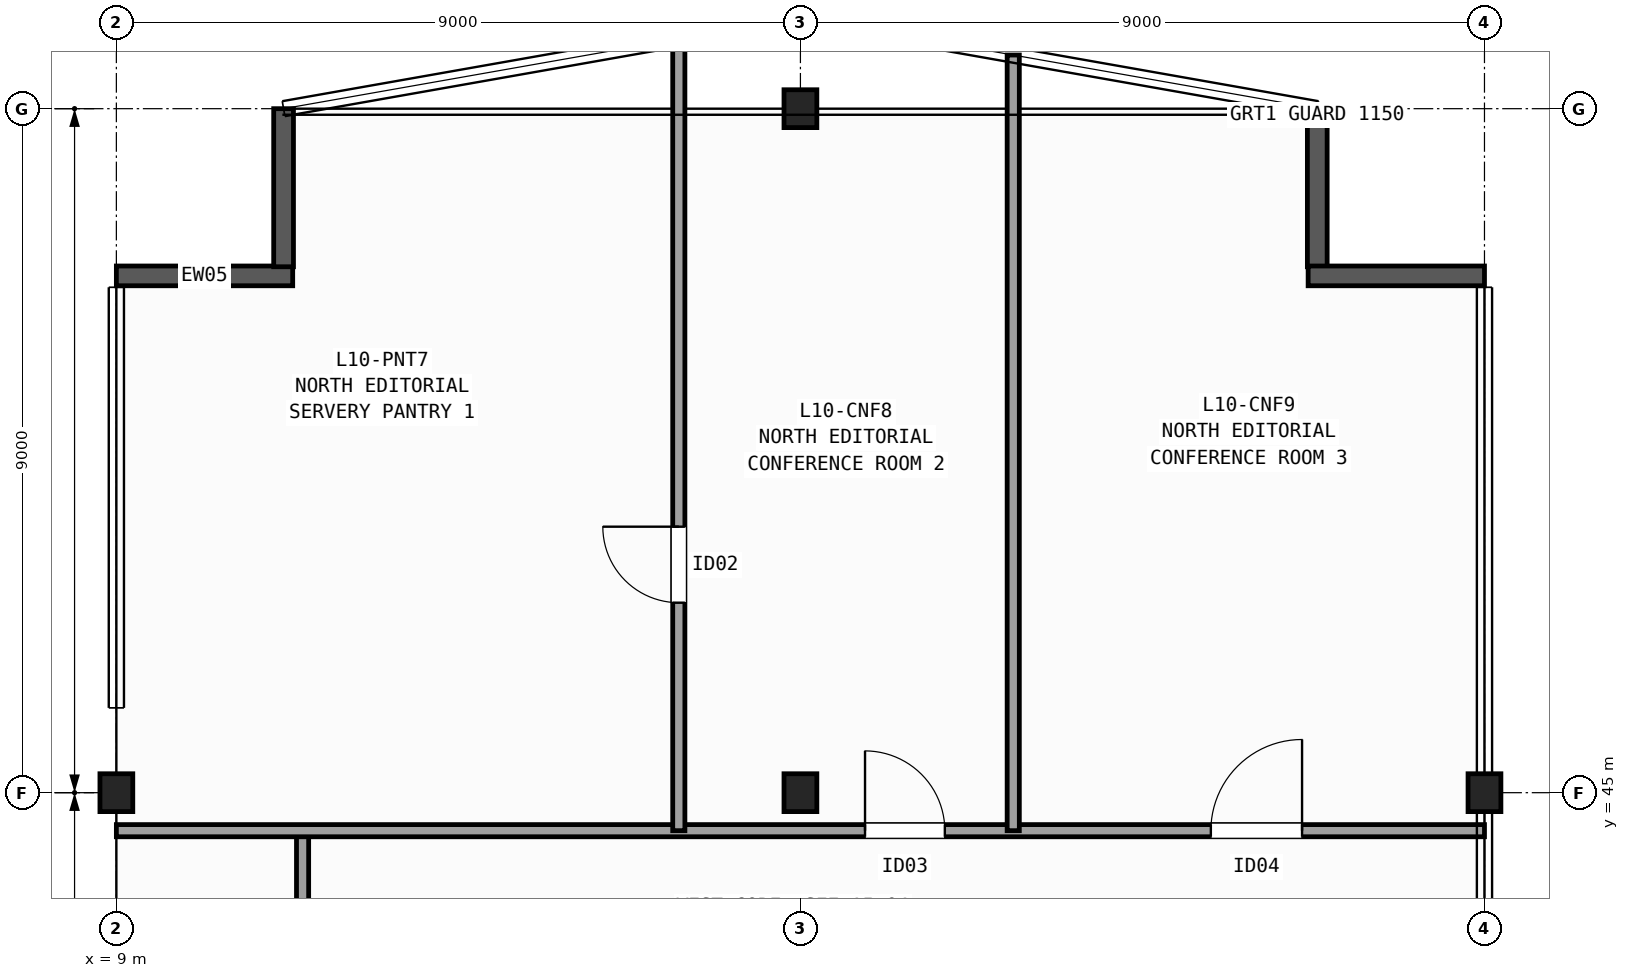
"""IFC4 building model, lengths in metres.
Left out: names, types, materials, properties, quantities, classifications, styles, units other than length and angle.
Written with IfcOpenShell. Run it as: python <this file> out.ifc"""

import sys

from ifc_helpers import new_model, si_unit, direction, frame, frame_2d, origin, origin_2d, place, context, subcontext, project, spatial, rectangle, i_section, extrude, element, fill, save


model = new_model("IFC4")
c1 = context("Model", 3, precision=1e-05, world=origin(), true_north=direction((0.0, 1.0)))
c2 = subcontext(c1, "Body", "Model", "MODEL_VIEW")
j1 = project(units=[si_unit("LENGTHUNIT", "METRE"), si_unit("PLANEANGLEUNIT", "RADIAN")], contexts=[c1])
p1 = place(None, origin())
s1 = spatial("IfcSite", under=j1, at=p1, CompositionType="ELEMENT")
p2 = place(p1, origin())
s2 = spatial("IfcBuilding", under=s1, at=p2, CompositionType="ELEMENT")
p3 = place(p2, frame((0.0, 0.0, 47.1)))
s3 = spatial("IfcBuildingStorey", under=s2, at=p3, CompositionType="ELEMENT", Elevation=47.1)
for number, where, z_axis, x_axis in (
    (1, (9.0, 45.0, 0.0), (0.0, 0.0, 1.0), (1.0, 0.0, 0.0)),
    (2, (18.0, 45.0, 0.0), (0.0, 0.0, 1.0), (1.0, 0.0, 0.0)),
    (3, (18.0, 54.0, 0.0), (0.0, 0.0, 1.0), (1.0, 0.0, 0.0)),
    (4, (27.0, 45.0, 0.0), (0.0, 0.0, 1.0), (1.0, 0.0, 0.0)),
):
    element("IfcColumn", number, at=place(p3, frame(where, z_axis=z_axis, x_axis=x_axis)), inside=s3, PredefinedType="COLUMN", context=c2, shape_type="SweptSolid", body=[
        extrude(i_section(OverallWidth=0.432, OverallDepth=0.498, WebThickness=0.056, FlangeThickness=0.089, FilletRadius=0.015, at=origin_2d()), origin(), (0.0, 0.0, 1.0), 3.7),
    ])
p4 = place(p3, frame((9.0, 51.8, 0.0), z_axis=(0.0, 0.0, 1.0), x_axis=(1.0, 0.0, 0.0)))
e5 = element("IfcWall", 5, at=p4, inside=s3, PredefinedType="SOLIDWALL", context=c2, shape_type="SweptSolid", body=[
    extrude(rectangle(XDim=2.32, YDim=0.26, at=frame_2d((1.16, 0.0))), origin(), (0.0, 0.0, 1.0), 3.42),
])
for number, where, z_axis, x_axis in (
    (6, (11.2, 51.92, 0.0), (0.0, 0.0, 1.0), (0.0, 1.0, 0.0)),
    (7, (24.8, 54.0, 0.0), (0.0, 0.0, 1.0), (0.0, -1.0, 0.0)),
):
    element("IfcWall", number, at=place(p3, frame(where, z_axis=z_axis, x_axis=x_axis)), inside=s3, PredefinedType="SOLIDWALL", context=c2, shape_type="SweptSolid", body=[
        extrude(rectangle(XDim=2.08, YDim=0.26, at=frame_2d((1.04, 0.0))), origin(), (0.0, 0.0, 1.0), 3.42),
    ])
p5 = place(p3, frame((24.68, 51.8, 0.0), z_axis=(0.0, 0.0, 1.0), x_axis=(1.0, 0.0, 0.0)))
e8 = element("IfcWall", 8, at=p5, inside=s3, PredefinedType="SOLIDWALL", context=c2, shape_type="SweptSolid", body=[
    extrude(rectangle(XDim=2.32, YDim=0.26, at=frame_2d((1.16, 0.0))), origin(), (0.0, 0.0, 1.0), 3.42),
])
p6 = place(p3, frame((11.45, 42.4, 0.0), z_axis=(0.0, 0.0, 1.0), x_axis=(0.0, 1.0, 0.0)))
e9 = element("IfcWall", 9, at=p6, inside=s3, PredefinedType="PARTITIONING", context=c2, shape_type="SweptSolid", body=[
    extrude(rectangle(XDim=2.1, YDim=0.16, at=frame_2d((1.05, 0.0))), origin(), (0.0, 0.0, 1.0), 3.42),
])
p7 = place(p3, frame((9.0, 44.5, 0.0), z_axis=(0.0, 0.0, 1.0), x_axis=(1.0, 0.0, 0.0)))
e10 = element("IfcWall", 10, at=p7, inside=s3, PredefinedType="PARTITIONING", context=c2, shape_type="SweptSolid", body=[
    extrude(rectangle(XDim=18.0, YDim=0.16, at=frame_2d((9.0, 0.0))), origin(), (0.0, 0.0, 1.0), 2.627),
])
p8 = place(p7, frame((9.85, 0.0, 0.0)))
e11 = element("IfcOpeningElement", 11, at=p8, cuts=e10, PredefinedType="OPENING", context=c2, shape_type="SweptSolid", body=[
    extrude(rectangle(XDim=1.05, YDim=2.15, at=frame_2d((0.525, 1.075))), frame((0.0, 0.09, 0.0), z_axis=(0.0, -1.0, 0.0), x_axis=(1.0, 0.0, 0.0)), (0.0, 0.0, 1.0), 0.18),
])
p9 = place(p7, frame((14.4, 0.0, 0.0)))
e12 = element("IfcOpeningElement", 12, at=p9, cuts=e10, PredefinedType="OPENING", context=c2, shape_type="SweptSolid", body=[
    extrude(rectangle(XDim=1.2, YDim=2.15, at=frame_2d((0.6, 1.075))), frame((0.0, 0.09, 0.0), z_axis=(0.0, -1.0, 0.0), x_axis=(1.0, 0.0, 0.0)), (0.0, 0.0, 1.0), 0.18),
])
p10 = place(p3, frame((16.4, 44.5, 0.0), z_axis=(0.0, 0.0, 1.0), x_axis=(0.0, 1.0, 0.0)))
e13 = element("IfcWall", 13, at=p10, inside=s3, PredefinedType="PARTITIONING", context=c2, shape_type="SweptSolid", body=[
    extrude(rectangle(XDim=10.418, YDim=0.16, at=frame_2d((5.209, 0.0))), origin(), (0.0, 0.0, 1.0), 3.42),
])
p11 = place(p10, frame((3.0, 0.0, 0.0)))
e14 = element("IfcOpeningElement", 14, at=p11, cuts=e13, PredefinedType="OPENING", context=c2, shape_type="SweptSolid", body=[
    extrude(rectangle(XDim=1.0, YDim=2.1, at=frame_2d((0.5, 1.05))), frame((0.0, 0.09, 0.0), z_axis=(0.0, -1.0, 0.0), x_axis=(1.0, 0.0, 0.0)), (0.0, 0.0, 1.0), 0.18),
])
p12 = place(p3, frame((20.8, 44.5, 0.0), z_axis=(0.0, 0.0, 1.0), x_axis=(0.0, 1.0, 0.0)))
e15 = element("IfcWall", 15, at=p12, inside=s3, PredefinedType="PARTITIONING", context=c2, shape_type="SweptSolid", body=[
    extrude(rectangle(XDim=10.206, YDim=0.16, at=frame_2d((5.103, 0.0))), origin(), (0.0, 0.0, 1.0), 3.42),
])
p13 = place(p11, origin())
e16 = element("IfcDoor", 16, at=p13, inside=s3, OperationType="SINGLE_SWING_RIGHT", PredefinedType="DOOR", context=c2, shape_type="SweptSolid", body=[
    extrude(rectangle(XDim=1.0, YDim=2.1, at=frame_2d((0.5, 1.05))), frame((0.0, 0.025, 0.0), z_axis=(0.0, -1.0, 0.0), x_axis=(1.0, 0.0, 0.0)), (0.0, 0.0, 1.0), 0.05),
])
fill(e14, e16)
p14 = place(p8, origin())
e17 = element("IfcDoor", 17, at=p14, inside=s3, OperationType="SINGLE_SWING_LEFT", PredefinedType="DOOR", context=c2, shape_type="SweptSolid", body=[
    extrude(rectangle(XDim=1.05, YDim=2.15, at=frame_2d((0.525, 1.075))), frame((0.0, 0.025, 0.0), z_axis=(0.0, -1.0, 0.0), x_axis=(1.0, 0.0, 0.0)), (0.0, 0.0, 1.0), 0.05),
])
fill(e11, e17)
p15 = place(p9, origin())
e18 = element("IfcDoor", 18, at=p15, inside=s3, OperationType="SINGLE_SWING_RIGHT", PredefinedType="DOOR", context=c2, shape_type="SweptSolid", body=[
    extrude(rectangle(XDim=1.2, YDim=2.15, at=frame_2d((0.6, 1.075))), frame((0.0, 0.025, 0.0), z_axis=(0.0, -1.0, 0.0), x_axis=(1.0, 0.0, 0.0)), (0.0, 0.0, 1.0), 0.05),
])
fill(e12, e18)
save(model, sys.argv[1])
